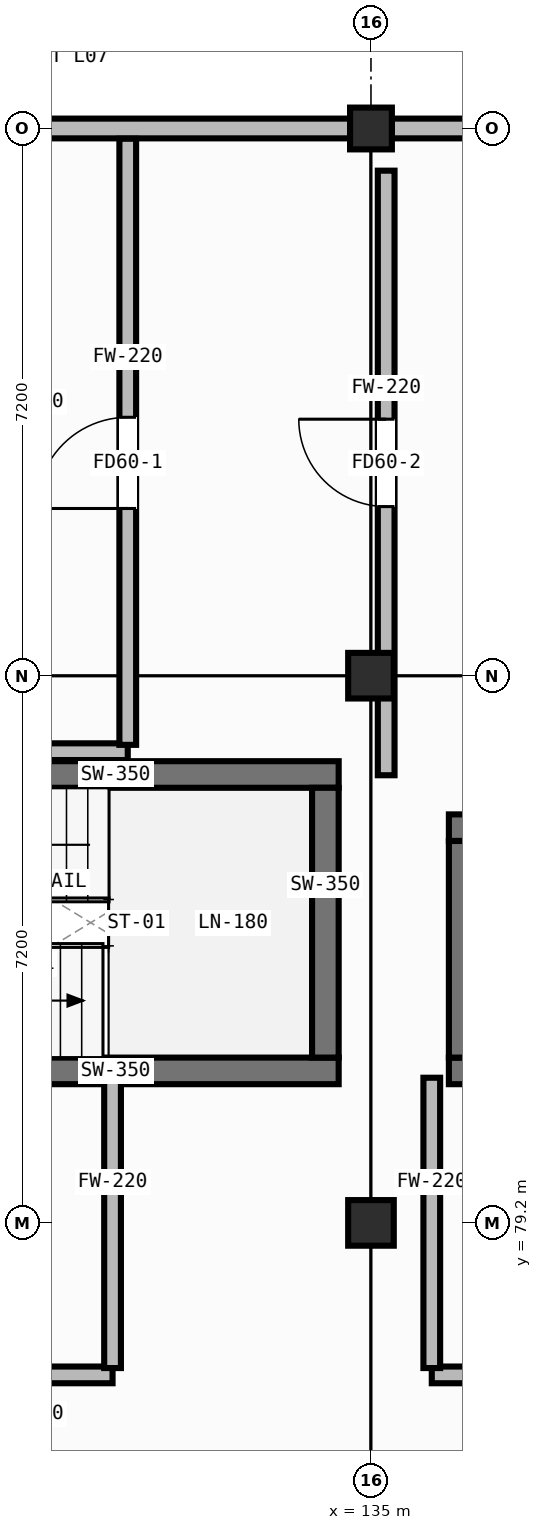
"""IFC4 building model, lengths in metres.
Left out: names, types, materials, properties, quantities, classifications, styles, units other than length and angle.
Written with IfcOpenShell. Run it as: python <this file> out.ifc"""

import sys

from ifc_helpers import new_model, si_unit, direction, frame, frame_2d, origin, origin_2d, place, context, subcontext, project, spatial, rectangle, hollow_rectangle, extrude, element, fill, save


model = new_model("IFC4")
c1 = context("Model", 3, precision=1e-05, world=origin(), true_north=direction((0.0, 1.0)))
c2 = subcontext(c1, "Body", "Model", "MODEL_VIEW")
j1 = project(units=[si_unit("LENGTHUNIT", "METRE"), si_unit("PLANEANGLEUNIT", "RADIAN")], contexts=[c1])
p1 = place(None, origin())
s1 = spatial("IfcSite", under=j1, at=p1, CompositionType="ELEMENT")
p2 = place(p1, origin())
s2 = spatial("IfcBuilding", under=s1, at=p2, CompositionType="ELEMENT")
p3 = place(p2, frame((0.0, 0.0, 24.2)))
s3 = spatial("IfcBuildingStorey", under=s2, at=p3, CompositionType="ELEMENT", Elevation=24.2)
for number, where, z_axis, x_axis in (
    (1, (135.0, 79.2, 0.0), (0.0, 0.0, 1.0), (1.0, 0.0, 0.0)),
    (2, (135.0, 86.4, 0.0), (0.0, 0.0, 1.0), (1.0, 0.0, 0.0)),
):
    element("IfcColumn", number, at=place(p3, frame(where, z_axis=z_axis, x_axis=x_axis)), inside=s3, PredefinedType="COLUMN", context=c2, shape_type="SweptSolid", body=[
        extrude(hollow_rectangle(XDim=0.6, YDim=0.6, WallThickness=0.025, at=origin_2d()), origin(), (0.0, 0.0, 1.0), 3.6),
    ])
p4 = place(p3, frame((135.0, 93.6, 0.0), z_axis=(0.0, 0.0, 1.0), x_axis=(1.0, 0.0, 0.0)))
e3 = element("IfcColumn", 3, at=p4, inside=s3, PredefinedType="COLUMN", context=c2, shape_type="SweptSolid", body=[
    extrude(hollow_rectangle(XDim=0.55, YDim=0.55, WallThickness=0.022, at=origin_2d()), origin(), (0.0, 0.0, 1.0), 3.6),
])
p5 = place(p3, frame((134.725, 93.6, 0.0), z_axis=(0.0, 0.0, 1.0), x_axis=(-1.0, 0.0, 0.0)))
e4 = element("IfcWall", 4, at=p5, inside=s3, PredefinedType="STANDARD", context=c2, shape_type="SweptSolid", body=[
    extrude(rectangle(XDim=8.45, YDim=0.26, at=frame_2d((4.225, 0.0))), origin(), (0.0, 0.0, 1.0), 2.92),
])
p6 = place(p3, frame((143.725, 93.6, 0.0), z_axis=(0.0, 0.0, 1.0), x_axis=(-1.0, 0.0, 0.0)))
e5 = element("IfcWall", 5, at=p6, inside=s3, PredefinedType="STANDARD", context=c2, shape_type="SweptSolid", body=[
    extrude(rectangle(XDim=8.45, YDim=0.26, at=frame_2d((4.225, 0.0))), origin(), (0.0, 0.0, 1.0), 2.92),
])
p7 = place(p6, frame((2.925, 0.0, 0.85)))
e6 = element("IfcOpeningElement", 6, at=p7, cuts=e5, PredefinedType="OPENING", context=c2, shape_type="SweptSolid", body=[
    extrude(rectangle(XDim=2.6, YDim=1.6, at=frame_2d((1.3, 0.8))), frame((0.0, 0.142, 0.0), z_axis=(0.0, -1.0, 0.0), x_axis=(1.0, 0.0, 0.0)), (0.0, 0.0, 1.0), 0.284),
])
p8 = place(p3, frame((126.425, 81.2, 0.0), z_axis=(0.0, 0.0, 1.0), x_axis=(1.0, 0.0, 0.0)))
e7 = element("IfcWall", 7, at=p8, inside=s3, PredefinedType="SHEAR", context=c2, shape_type="SweptSolid", body=[
    extrude(rectangle(XDim=8.15, YDim=0.35, at=frame_2d((4.075, 0.0))), origin(), (0.0, 0.0, 1.0), 3.32),
])
p9 = place(p8, frame((0.525, 0.0, 0.0)))
e8 = element("IfcOpeningElement", 8, at=p9, cuts=e7, PredefinedType="OPENING", context=c2, shape_type="SweptSolid", body=[
    extrude(rectangle(XDim=1.15, YDim=2.1, at=frame_2d((0.575, 1.05))), frame((0.0, 0.187, 0.0), z_axis=(0.0, -1.0, 0.0), x_axis=(1.0, 0.0, 0.0)), (0.0, 0.0, 1.0), 0.374),
])
p10 = place(p3, frame((126.425, 85.1, 0.0), z_axis=(0.0, 0.0, 1.0), x_axis=(1.0, 0.0, 0.0)))
e9 = element("IfcWall", 9, at=p10, inside=s3, PredefinedType="SHEAR", context=c2, shape_type="SweptSolid", body=[
    extrude(rectangle(XDim=8.15, YDim=0.35, at=frame_2d((4.075, 0.0))), origin(), (0.0, 0.0, 1.0), 3.32),
])
p11 = place(p3, frame((134.4, 81.375, 0.0), z_axis=(0.0, 0.0, 1.0), x_axis=(0.0, 1.0, 0.0)))
e10 = element("IfcWall", 10, at=p11, inside=s3, PredefinedType="SHEAR", context=c2, shape_type="SweptSolid", body=[
    extrude(rectangle(XDim=3.55, YDim=0.35, at=frame_2d((1.775, 0.0))), origin(), (0.0, 0.0, 1.0), 3.32),
])
p12 = place(p3, frame((136.025, 81.2, 0.0), z_axis=(0.0, 0.0, 1.0), x_axis=(1.0, 0.0, 0.0)))
e11 = element("IfcWall", 11, at=p12, inside=s3, PredefinedType="SHEAR", context=c2, shape_type="SweptSolid", body=[
    extrude(rectangle(XDim=2.75, YDim=0.35, at=frame_2d((1.375, 0.0))), origin(), (0.0, 0.0, 1.0), 3.32),
])
p13 = place(p12, frame((0.8, 0.0, 0.0)))
e12 = element("IfcOpeningElement", 12, at=p13, cuts=e11, PredefinedType="OPENING", context=c2, shape_type="SweptSolid", body=[
    extrude(rectangle(XDim=1.15, YDim=2.12, at=frame_2d((0.575, 1.06))), frame((0.0, 0.187, 0.0), z_axis=(0.0, -1.0, 0.0), x_axis=(1.0, 0.0, 0.0)), (0.0, 0.0, 1.0), 0.374),
])
p14 = place(p3, frame((136.025, 84.4, 0.0), z_axis=(0.0, 0.0, 1.0), x_axis=(1.0, 0.0, 0.0)))
e13 = element("IfcWall", 13, at=p14, inside=s3, PredefinedType="SHEAR", context=c2, shape_type="SweptSolid", body=[
    extrude(rectangle(XDim=2.75, YDim=0.35, at=frame_2d((1.375, 0.0))), origin(), (0.0, 0.0, 1.0), 3.32),
])
p15 = place(p3, frame((136.2, 81.375, 0.0), z_axis=(0.0, 0.0, 1.0), x_axis=(0.0, 1.0, 0.0)))
e14 = element("IfcWall", 14, at=p15, inside=s3, PredefinedType="SHEAR", context=c2, shape_type="SweptSolid", body=[
    extrude(rectangle(XDim=2.85, YDim=0.35, at=frame_2d((1.425, 0.0))), origin(), (0.0, 0.0, 1.0), 3.32),
])
p16 = place(p3, frame((126.6, 77.2, 0.0), z_axis=(0.0, 0.0, 1.0), x_axis=(1.0, 0.0, 0.0)))
e15 = element("IfcWall", 15, at=p16, inside=s3, PredefinedType="PARTITIONING", context=c2, shape_type="SweptSolid", body=[
    extrude(rectangle(XDim=5.0, YDim=0.22, at=frame_2d((2.5, 0.0))), origin(), (0.0, 0.0, 1.0), 3.32),
])
p17 = place(p16, frame((1.925, 0.0, 0.0)))
e16 = element("IfcOpeningElement", 16, at=p17, cuts=e15, PredefinedType="OPENING", context=c2, shape_type="SweptSolid", body=[
    extrude(rectangle(XDim=1.15, YDim=2.1, at=frame_2d((0.575, 1.05))), frame((0.0, 0.122, 0.0), z_axis=(0.0, -1.0, 0.0), x_axis=(1.0, 0.0, 0.0)), (0.0, 0.0, 1.0), 0.244),
])
p18 = place(p3, frame((131.6, 77.29, 0.0), z_axis=(0.0, 0.0, 1.0), x_axis=(0.0, 1.0, 0.0)))
e17 = element("IfcWall", 17, at=p18, inside=s3, PredefinedType="PARTITIONING", context=c2, shape_type="SweptSolid", body=[
    extrude(rectangle(XDim=3.82, YDim=0.22, at=frame_2d((1.91, 0.0))), origin(), (0.0, 0.0, 1.0), 3.32),
])
p19 = place(p3, frame((135.8, 77.2, 0.0), z_axis=(0.0, 0.0, 1.0), x_axis=(1.0, 0.0, 0.0)))
e18 = element("IfcWall", 18, at=p19, inside=s3, PredefinedType="PARTITIONING", context=c2, shape_type="SweptSolid", body=[
    extrude(rectangle(XDim=7.8, YDim=0.22, at=frame_2d((3.9, 0.0))), origin(), (0.0, 0.0, 1.0), 3.32),
])
p20 = place(p19, frame((3.175, 0.0, 0.0)))
e19 = element("IfcOpeningElement", 19, at=p20, cuts=e18, PredefinedType="OPENING", context=c2, shape_type="SweptSolid", body=[
    extrude(rectangle(XDim=1.05, YDim=2.02, at=frame_2d((0.525, 1.01))), frame((0.0, 0.122, 0.0), z_axis=(0.0, -1.0, 0.0), x_axis=(1.0, 0.0, 0.0)), (0.0, 0.0, 1.0), 0.244),
])
p21 = place(p3, frame((135.8, 77.29, 0.0), z_axis=(0.0, 0.0, 1.0), x_axis=(0.0, 1.0, 0.0)))
e20 = element("IfcWall", 20, at=p21, inside=s3, PredefinedType="PARTITIONING", context=c2, shape_type="SweptSolid", body=[
    extrude(rectangle(XDim=3.82, YDim=0.22, at=frame_2d((1.91, 0.0))), origin(), (0.0, 0.0, 1.0), 3.32),
])
p22 = place(p3, frame((126.135, 85.4, 0.0), z_axis=(0.0, 0.0, 1.0), x_axis=(1.0, 0.0, 0.0)))
e21 = element("IfcWall", 21, at=p22, inside=s3, PredefinedType="PARTITIONING", context=c2, shape_type="SweptSolid", body=[
    extrude(rectangle(XDim=5.665, YDim=0.22, at=frame_2d((2.833, 0.0))), origin(), (0.0, 0.0, 1.0), 3.32),
])
p23 = place(p3, frame((131.8, 85.49, 0.0), z_axis=(0.0, 0.0, 1.0), x_axis=(0.0, 1.0, 0.0)))
e22 = element("IfcWall", 22, at=p23, inside=s3, PredefinedType="PARTITIONING", context=c2, shape_type="SweptSolid", body=[
    extrude(rectangle(XDim=7.975, YDim=0.22, at=frame_2d((3.988, 0.0))), origin(), (0.0, 0.0, 1.0), 3.32),
])
p24 = place(p23, frame((3.11, 0.0, 0.0)))
e23 = element("IfcOpeningElement", 23, at=p24, cuts=e22, PredefinedType="OPENING", context=c2, shape_type="SweptSolid", body=[
    extrude(rectangle(XDim=1.2, YDim=2.1, at=frame_2d((0.6, 1.05))), frame((0.0, 0.122, 0.0), z_axis=(0.0, -1.0, 0.0), x_axis=(1.0, 0.0, 0.0)), (0.0, 0.0, 1.0), 0.244),
])
p25 = place(p3, frame((135.2, 85.09, 0.0), z_axis=(0.0, 0.0, 1.0), x_axis=(0.0, 1.0, 0.0)))
e24 = element("IfcWall", 24, at=p25, inside=s3, PredefinedType="PARTITIONING", context=c2, shape_type="SweptSolid", body=[
    extrude(rectangle(XDim=7.955, YDim=0.22, at=frame_2d((3.978, 0.0))), origin(), (0.0, 0.0, 1.0), 2.6),
])
p26 = place(p25, frame((3.535, 0.0, 0.0)))
e25 = element("IfcOpeningElement", 25, at=p26, cuts=e24, PredefinedType="OPENING", context=c2, shape_type="SweptSolid", body=[
    extrude(rectangle(XDim=1.15, YDim=2.1, at=frame_2d((0.575, 1.05))), frame((0.0, 0.122, 0.0), z_axis=(0.0, -1.0, 0.0), x_axis=(1.0, 0.0, 0.0)), (0.0, 0.0, 1.0), 0.244),
])
p27 = place(p24, origin())
e26 = element("IfcDoor", 26, at=p27, inside=s3, OperationType="SINGLE_SWING_LEFT", PredefinedType="DOOR", context=c2, shape_type="SweptSolid", body=[
    extrude(rectangle(XDim=1.2, YDim=2.1, at=frame_2d((0.6, 1.05))), frame((0.0, 0.025, 0.0), z_axis=(0.0, -1.0, 0.0), x_axis=(1.0, 0.0, 0.0)), (0.0, 0.0, 1.0), 0.05),
])
fill(e23, e26)
p28 = place(p26, origin())
e27 = element("IfcDoor", 27, at=p28, inside=s3, OperationType="SINGLE_SWING_RIGHT", PredefinedType="DOOR", context=c2, shape_type="SweptSolid", body=[
    extrude(rectangle(XDim=1.15, YDim=2.1, at=frame_2d((0.575, 1.05))), frame((0.0, 0.025, 0.0), z_axis=(0.0, -1.0, 0.0), x_axis=(1.0, 0.0, 0.0)), (0.0, 0.0, 1.0), 0.05),
])
fill(e25, e27)
save(model, sys.argv[1])
